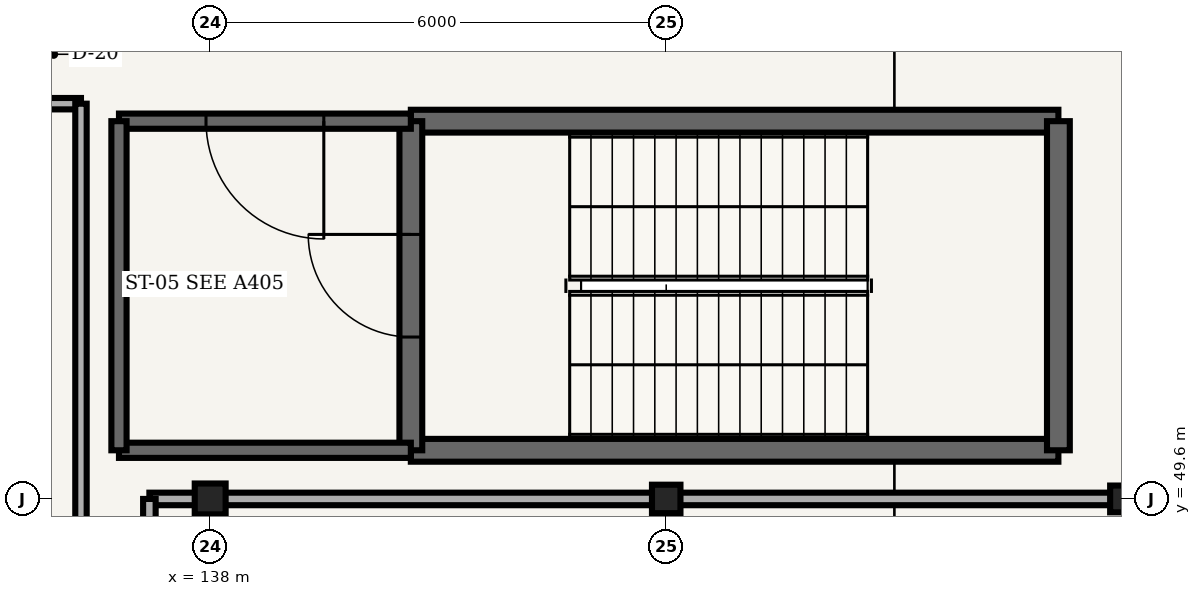
"""IFC4 building model, lengths in metres.
Left out: names, types, materials, properties, quantities, classifications, styles, units other than length and angle.
Written with IfcOpenShell. Run it as: python <this file> out.ifc"""

import sys

from ifc_helpers import new_model, si_unit, direction, frame, frame_2d, origin, origin_2d, place, context, subcontext, project, spatial, rectangle, hollow_circle, i_section, extrude, element, fill, save


model = new_model("IFC4")
c1 = context("Model", 3, precision=1e-05, world=origin(), true_north=direction((0.0, 1.0)))
c2 = subcontext(c1, "Body", "Model", "MODEL_VIEW")
j1 = project(units=[si_unit("LENGTHUNIT", "METRE"), si_unit("PLANEANGLEUNIT", "RADIAN")], contexts=[c1])
p1 = place(None, origin())
s1 = spatial("IfcSite", under=j1, at=p1, CompositionType="ELEMENT")
p2 = place(p1, origin())
s2 = spatial("IfcBuilding", under=s1, at=p2, CompositionType="ELEMENT")
p3 = place(p2, origin())
s3 = spatial("IfcBuildingStorey", under=s2, at=p3, CompositionType="ELEMENT", Elevation=0.0)
p4 = place(p3, frame((138.0, 49.6, 0.0), z_axis=(0.0, 0.0, 1.0), x_axis=(1.0, 0.0, 0.0)))
e1 = element("IfcColumn", 1, at=p4, inside=s3, PredefinedType="COLUMN", context=c2, shape_type="SweptSolid", body=[
    extrude(hollow_circle(Radius=0.203, WallThickness=0.016, at=origin_2d()), origin(), (0.0, 0.0, 1.0), 5.4),
])
p5 = place(p3, frame((144.0, 49.6, 0.0), z_axis=(0.0, 0.0, 1.0), x_axis=(1.0, 0.0, 0.0)))
e2 = element("IfcColumn", 2, at=p5, inside=s3, PredefinedType="COLUMN", context=c2, shape_type="SweptSolid", body=[
    extrude(i_section(OverallWidth=0.375, OverallDepth=0.375, WebThickness=0.017, FlangeThickness=0.027, FilletRadius=0.015, at=origin_2d()), origin(), (0.0, 0.0, 1.0), 5.4),
])
p6 = place(p3, frame((150.0, 49.6, 0.0), z_axis=(0.0, 0.0, 1.0), x_axis=(1.0, 0.0, 0.0)))
e3 = element("IfcColumn", 3, at=p6, inside=s3, PredefinedType="COLUMN", context=c2, shape_type="SweptSolid", body=[
    extrude(i_section(OverallWidth=0.318, OverallDepth=0.353, WebThickness=0.023, FlangeThickness=0.038, FilletRadius=0.015, at=origin_2d()), origin(), (0.0, 0.0, 1.0), 5.4),
])
for number, where, z_axis, x_axis in (
    (4, (140.64, 50.24, 0.0), (0.0, 0.0, 1.0), (1.0, 0.0, 0.0)),
    (5, (149.16, 54.57, 0.0), (0.0, 0.0, 1.0), (-1.0, 0.0, 0.0)),
):
    element("IfcWall", number, at=place(p3, frame(where, z_axis=z_axis, x_axis=x_axis)), inside=s3, PredefinedType="SHEAR", context=c2, shape_type="SweptSolid", body=[
        extrude(rectangle(XDim=8.52, YDim=0.3, at=frame_2d((4.26, 0.0))), origin(), (0.0, 0.0, 1.0), 5.15),
    ])
p7 = place(p3, frame((140.64, 54.57, 0.0), z_axis=(0.0, 0.0, 1.0), x_axis=(0.0, -1.0, 0.0)))
e6 = element("IfcWall", 6, at=p7, inside=s3, PredefinedType="SHEAR", context=c2, shape_type="SweptSolid", body=[
    extrude(rectangle(XDim=4.33, YDim=0.3, at=frame_2d((2.165, 0.0))), origin(), (0.0, 0.0, 1.0), 5.15),
])
p8 = place(p7, frame((1.49, 0.0, 0.0)))
e7 = element("IfcOpeningElement", 7, at=p8, cuts=e6, PredefinedType="OPENING", context=c2, shape_type="SweptSolid", body=[
    extrude(rectangle(XDim=1.35, YDim=2.2, at=frame_2d((0.675, 1.1))), frame((0.0, 0.16, 0.0), z_axis=(0.0, -1.0, 0.0), x_axis=(1.0, 0.0, 0.0)), (0.0, 0.0, 1.0), 0.32),
])
p9 = place(p3, frame((149.16, 50.24, 0.0), z_axis=(0.0, 0.0, 1.0), x_axis=(0.0, 1.0, 0.0)))
e8 = element("IfcWall", 8, at=p9, inside=s3, PredefinedType="SHEAR", context=c2, shape_type="SweptSolid", body=[
    extrude(rectangle(XDim=4.33, YDim=0.3, at=frame_2d((2.165, 0.0))), origin(), (0.0, 0.0, 1.0), 5.15),
])
p10 = place(p3, frame((136.8, 50.24, 0.0), z_axis=(0.0, 0.0, 1.0), x_axis=(1.0, 0.0, 0.0)))
e9 = element("IfcWall", 9, at=p10, inside=s3, PredefinedType="SHEAR", context=c2, shape_type="SweptSolid", body=[
    extrude(rectangle(XDim=3.84, YDim=0.2, at=frame_2d((1.92, 0.0))), origin(), (0.0, 0.0, 1.0), 5.15),
])
p11 = place(p3, frame((140.64, 54.57, 0.0), z_axis=(0.0, 0.0, 1.0), x_axis=(-1.0, 0.0, 0.0)))
e10 = element("IfcWall", 10, at=p11, inside=s3, PredefinedType="SHEAR", context=c2, shape_type="SweptSolid", body=[
    extrude(rectangle(XDim=3.84, YDim=0.2, at=frame_2d((1.92, 0.0))), origin(), (0.0, 0.0, 1.0), 5.15),
])
p12 = place(p11, frame((1.145, 0.0, 0.0)))
e11 = element("IfcOpeningElement", 11, at=p12, cuts=e10, PredefinedType="OPENING", context=c2, shape_type="SweptSolid", body=[
    extrude(rectangle(XDim=1.55, YDim=2.2, at=frame_2d((0.775, 1.1))), frame((0.0, 0.11, 0.0), z_axis=(0.0, -1.0, 0.0), x_axis=(1.0, 0.0, 0.0)), (0.0, 0.0, 1.0), 0.22),
])
p13 = place(p3, frame((136.8, 54.57, 0.0), z_axis=(0.0, 0.0, 1.0), x_axis=(0.0, -1.0, 0.0)))
e12 = element("IfcWall", 12, at=p13, inside=s3, PredefinedType="SHEAR", context=c2, shape_type="SweptSolid", body=[
    extrude(rectangle(XDim=4.33, YDim=0.2, at=frame_2d((2.165, 0.0))), origin(), (0.0, 0.0, 1.0), 5.15),
])
p14 = place(p3, frame((132.4, 54.8, 0.0), z_axis=(0.0, 0.0, 1.0), x_axis=(1.0, 0.0, 0.0)))
e13 = element("IfcWall", 13, at=p14, inside=s3, PredefinedType="PARTITIONING", context=c2, shape_type="SweptSolid", body=[
    extrude(rectangle(XDim=3.9, YDim=0.15, at=frame_2d((1.95, 0.0))), origin(), (0.0, 0.0, 1.0), 4.35),
])
p15 = place(p14, frame((1.15, 0.0, 0.0)))
e14 = element("IfcOpeningElement", 14, at=p15, cuts=e13, PredefinedType="OPENING", context=c2, shape_type="SweptSolid", body=[
    extrude(rectangle(XDim=1.6, YDim=2.25, at=frame_2d((0.8, 1.125))), frame((0.0, 0.085, 0.0), z_axis=(0.0, -1.0, 0.0), x_axis=(1.0, 0.0, 0.0)), (0.0, 0.0, 1.0), 0.17),
])
p16 = place(p3, frame((136.3, 54.8, 0.0), z_axis=(0.0, 0.0, 1.0), x_axis=(0.0, -1.0, 0.0)))
e15 = element("IfcWall", 15, at=p16, inside=s3, PredefinedType="PARTITIONING", context=c2, shape_type="SweptSolid", body=[
    extrude(rectangle(XDim=16.8, YDim=0.15, at=frame_2d((8.4, 0.0))), origin(), (0.0, 0.0, 1.0), 4.35),
])
p17 = place(p3, frame((137.2, 49.6, 0.0), z_axis=(0.0, 0.0, 1.0), x_axis=(1.0, 0.0, 0.0)))
e16 = element("IfcWall", 16, at=p17, inside=s3, PredefinedType="PARTITIONING", context=c2, shape_type="SweptSolid", body=[
    extrude(rectangle(XDim=18.2, YDim=0.165, at=frame_2d((9.1, 0.0))), origin(), (0.0, 0.0, 1.0), 4.35),
])
p18 = place(p17, frame((14.024, 0.0, 0.0)))
e17 = element("IfcOpeningElement", 17, at=p18, cuts=e16, PredefinedType="OPENING", context=c2, shape_type="SweptSolid", body=[
    extrude(rectangle(XDim=1.8, YDim=2.25, at=frame_2d((0.9, 1.125))), frame((0.0, 0.093, 0.0), z_axis=(0.0, -1.0, 0.0), x_axis=(1.0, 0.0, 0.0)), (0.0, 0.0, 1.0), 0.185),
])
p19 = place(p3, frame((137.2, 38.0, 0.0), z_axis=(0.0, 0.0, 1.0), x_axis=(0.0, 1.0, 0.0)))
e18 = element("IfcWall", 18, at=p19, inside=s3, PredefinedType="PARTITIONING", context=c2, shape_type="SweptSolid", body=[
    extrude(rectangle(XDim=11.6, YDim=0.165, at=frame_2d((5.8, 0.0))), origin(), (0.0, 0.0, 1.0), 4.35),
])
p20 = place(p8, origin())
e19 = element("IfcDoor", 19, at=p20, inside=s3, OperationType="SINGLE_SWING_RIGHT", PredefinedType="DOOR", context=c2, shape_type="SweptSolid", body=[
    extrude(rectangle(XDim=1.35, YDim=2.2, at=frame_2d((0.675, 1.1))), frame((0.0, 0.025, 0.0), z_axis=(0.0, -1.0, 0.0), x_axis=(1.0, 0.0, 0.0)), (0.0, 0.0, 1.0), 0.05),
])
fill(e7, e19)
p21 = place(p12, origin())
e20 = element("IfcDoor", 20, at=p21, inside=s3, OperationType="SINGLE_SWING_LEFT", PredefinedType="DOOR", context=c2, shape_type="SweptSolid", body=[
    extrude(rectangle(XDim=1.55, YDim=2.2, at=frame_2d((0.775, 1.1))), frame((0.0, 0.025, 0.0), z_axis=(0.0, -1.0, 0.0), x_axis=(1.0, 0.0, 0.0)), (0.0, 0.0, 1.0), 0.05),
])
fill(e11, e20)
save(model, sys.argv[1])
